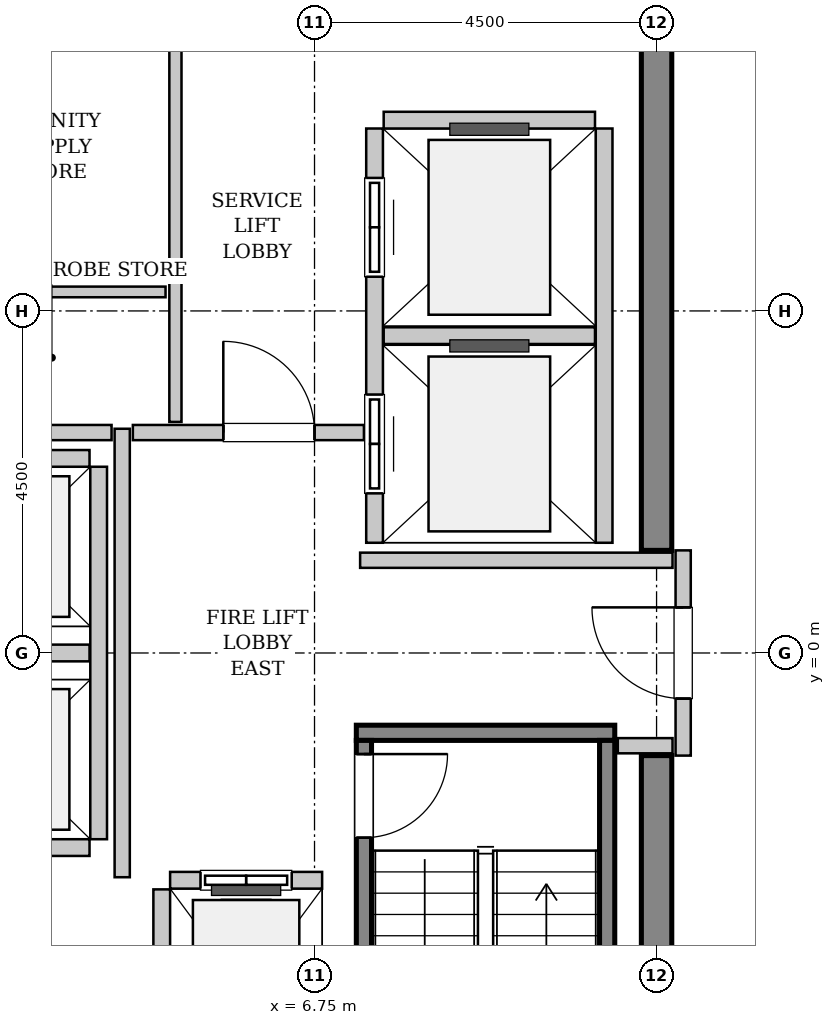
"""IFC4 building model, lengths in metres.
Left out: names, types, materials, properties, quantities, classifications, styles, units other than length and angle.
Written with IfcOpenShell. Run it as: python <this file> out.ifc"""

import sys

from ifc_helpers import new_model, si_unit, direction, frame, frame_2d, origin, place, context, subcontext, project, spatial, rectangle, extrude, source, transform, mapped, element, fill, save


model = new_model("IFC4")
c1 = context("Model", 3, precision=1e-05, world=origin(), true_north=direction((0.0, 1.0)))
c2 = subcontext(c1, "Body", "Model", "MODEL_VIEW")
j1 = project(units=[si_unit("LENGTHUNIT", "METRE"), si_unit("PLANEANGLEUNIT", "RADIAN")], contexts=[c1])
p1 = place(None, origin())
s1 = spatial("IfcSite", under=j1, at=p1, CompositionType="ELEMENT")
p2 = place(p1, origin())
s2 = spatial("IfcBuilding", under=s1, at=p2, CompositionType="ELEMENT")
p3 = place(p2, frame((0.0, 0.0, 349.0)))
s3 = spatial("IfcBuildingStorey", under=s2, at=p3, CompositionType="ELEMENT", Elevation=349.0)
m1 = source(origin(), c2, "Body", "SweptSolid", [
    extrude(rectangle(XDim=7.45, YDim=0.4, at=frame_2d((3.725, 0.0))), origin(), (0.0, 0.0, 1.0), 4.8),
])
for number, where, z_axis, x_axis in (
    (1, (11.25, -8.8, 0.0), (0.0, 0.0, 1.0), (0.0, 1.0, 0.0)),
    (2, (11.25, 1.35, 0.0), (0.0, 0.0, 1.0), (0.0, 1.0, 0.0)),
):
    element("IfcWall", number, at=place(p3, frame(where, z_axis=z_axis, x_axis=x_axis)), inside=s3, PredefinedType="SHEAR", context=c2, shape_type="MappedRepresentation", body=[
        mapped(m1, transform((0.0, 0.0, 0.0), x_axis=(1.0, 0.0, 0.0), y_axis=(0.0, 1.0, 0.0), z_axis=(0.0, 0.0, 1.0), scale=1.0)),
    ])
m2 = source(origin(), c2, "Body", "SweptSolid", [
    extrude(rectangle(XDim=3.4, YDim=0.2, at=frame_2d((1.7, 0.0))), origin(), (0.0, 0.0, 1.0), 4.8),
])
p4 = place(p3, frame((7.3, -1.05, 0.0), z_axis=(0.0, 0.0, 1.0), x_axis=(1.0, 0.0, 0.0)))
e3 = element("IfcWall", 3, at=p4, inside=s3, PredefinedType="SOLIDWALL", context=c2, shape_type="MappedRepresentation", body=[
    mapped(m2, transform((0.0, 0.0, 0.0), x_axis=(1.0, 0.0, 0.0), y_axis=(0.0, 1.0, 0.0), z_axis=(0.0, 0.0, 1.0), scale=1.0)),
])
m3 = source(origin(), c2, "Body", "SweptSolid", [
    extrude(rectangle(XDim=7.1, YDim=0.2, at=frame_2d((3.55, 0.0))), origin(), (0.0, 0.0, 1.0), 4.8),
])
p5 = place(p3, frame((7.4, -1.15, 0.0), z_axis=(0.0, 0.0, 1.0), x_axis=(0.0, -1.0, 0.0)))
e4 = element("IfcWall", 4, at=p5, inside=s3, PredefinedType="SOLIDWALL", context=c2, shape_type="MappedRepresentation", body=[
    mapped(m3, transform((0.0, 0.0, 0.0), x_axis=(1.0, 0.0, 0.0), y_axis=(0.0, 1.0, 0.0), z_axis=(0.0, 0.0, 1.0), scale=1.0)),
])
p6 = place(p5, frame((0.18, 0.0, 0.0)))
e5 = element("IfcOpeningElement", 5, at=p6, cuts=e4, PredefinedType="OPENING", context=c2, shape_type="SweptSolid", body=[
    extrude(rectangle(XDim=1.1, YDim=2.15, at=frame_2d((0.55, 1.075))), frame((0.0, 0.11, 0.0), z_axis=(0.0, -1.0, 0.0), x_axis=(1.0, 0.0, 0.0)), (0.0, 0.0, 1.0), 0.22),
])
p7 = place(p3, frame((10.6, -1.15, 0.0), z_axis=(0.0, 0.0, 1.0), x_axis=(0.0, -1.0, 0.0)))
e6 = element("IfcWall", 6, at=p7, inside=s3, PredefinedType="SOLIDWALL", context=c2, shape_type="MappedRepresentation", body=[
    mapped(m3, transform((0.0, 0.0, 0.0), x_axis=(1.0, 0.0, 0.0), y_axis=(0.0, 1.0, 0.0), z_axis=(0.0, 0.0, 1.0), scale=1.0)),
])
m4 = source(origin(), c2, "Body", "SweptSolid", [
    extrude(rectangle(XDim=2.0, YDim=0.22, at=frame_2d((1.0, 0.0))), origin(), (0.0, 0.0, 1.0), 4.485),
])
p8 = place(p3, frame((6.85, -2.99, 0.0), z_axis=(0.0, 0.0, 1.0), x_axis=(-1.0, 0.0, 0.0)))
e7 = element("IfcWall", 7, at=p8, inside=s3, PredefinedType="SOLIDWALL", context=c2, shape_type="MappedRepresentation", body=[
    mapped(m4, transform((0.0, 0.0, 0.0), x_axis=(1.0, 0.0, 0.0), y_axis=(0.0, 1.0, 0.0), z_axis=(0.0, 0.0, 1.0), scale=1.0)),
])
p9 = place(p8, frame((0.4, 0.0, 0.0)))
e8 = element("IfcOpeningElement", 8, at=p9, cuts=e7, PredefinedType="OPENING", context=c2, shape_type="SweptSolid", body=[
    extrude(rectangle(XDim=1.2, YDim=2.2, at=frame_2d((0.6, 1.1))), frame((0.0, 0.12, 0.0), z_axis=(0.0, -1.0, 0.0), x_axis=(1.0, 0.0, 0.0)), (0.0, 0.0, 1.0), 0.24),
])
m5 = source(origin(), c2, "Body", "SweptSolid", [
    extrude(rectangle(XDim=2.68, YDim=0.22, at=frame_2d((1.34, 0.0))), origin(), (0.0, 0.0, 1.0), 4.485),
])
p10 = place(p3, frame((4.74, -3.11, 0.0), z_axis=(0.0, 0.0, 1.0), x_axis=(0.0, -1.0, 0.0)))
e9 = element("IfcWall", 9, at=p10, inside=s3, PredefinedType="SOLIDWALL", context=c2, shape_type="MappedRepresentation", body=[
    mapped(m5, transform((0.0, 0.0, 0.0), x_axis=(1.0, 0.0, 0.0), y_axis=(0.0, 1.0, 0.0), z_axis=(0.0, 0.0, 1.0), scale=1.0)),
])
m6 = source(origin(), c2, "Body", "SweptSolid", [
    extrude(rectangle(XDim=5.45, YDim=0.22, at=frame_2d((2.725, 0.0))), origin(), (0.0, 0.0, 1.0), 4.485),
])
p11 = place(p3, frame((7.54, 6.9, 0.0), z_axis=(0.0, 0.0, 1.0), x_axis=(0.0, -1.0, 0.0)))
e10 = element("IfcWall", 10, at=p11, inside=s3, PredefinedType="SOLIDWALL", context=c2, shape_type="MappedRepresentation", body=[
    mapped(m6, transform((0.0, 0.0, 0.0), x_axis=(1.0, 0.0, 0.0), y_axis=(0.0, 1.0, 0.0), z_axis=(0.0, 0.0, 1.0), scale=1.0)),
])
p12 = place(p11, frame((3.5, 0.0, 0.0)))
e11 = element("IfcOpeningElement", 11, at=p12, cuts=e10, PredefinedType="OPENING", context=c2, shape_type="SweptSolid", body=[
    extrude(rectangle(XDim=1.3, YDim=2.3, at=frame_2d((0.65, 1.15))), frame((0.0, 0.12, 0.0), z_axis=(0.0, -1.0, 0.0), x_axis=(1.0, 0.0, 0.0)), (0.0, 0.0, 1.0), 0.24),
])
p13 = place(p11, frame((0.65, 0.0, 0.0)))
e12 = element("IfcOpeningElement", 12, at=p13, cuts=e10, PredefinedType="OPENING", context=c2, shape_type="SweptSolid", body=[
    extrude(rectangle(XDim=1.3, YDim=2.3, at=frame_2d((0.65, 1.15))), frame((0.0, 0.12, 0.0), z_axis=(0.0, -1.0, 0.0), x_axis=(1.0, 0.0, 0.0)), (0.0, 0.0, 1.0), 0.24),
])
p14 = place(p3, frame((10.56, 1.45, 0.0), z_axis=(0.0, 0.0, 1.0), x_axis=(0.0, 1.0, 0.0)))
e13 = element("IfcWall", 13, at=p14, inside=s3, PredefinedType="SOLIDWALL", context=c2, shape_type="MappedRepresentation", body=[
    mapped(m6, transform((0.0, 0.0, 0.0), x_axis=(1.0, 0.0, 0.0), y_axis=(0.0, 1.0, 0.0), z_axis=(0.0, 0.0, 1.0), scale=1.0)),
])
m7 = source(origin(), c2, "Body", "SweptSolid", [
    extrude(rectangle(XDim=2.78, YDim=0.22, at=frame_2d((1.39, 0.0))), origin(), (0.0, 0.0, 1.0), 4.485),
])
for number, where, z_axis, x_axis in (
    (14, (7.66, 4.175, 0.0), (0.0, 0.0, 1.0), (1.0, 0.0, 0.0)),
    (15, (10.44, 7.01, 0.0), (0.0, 0.0, 1.0), (-1.0, 0.0, 0.0)),
):
    element("IfcWall", number, at=place(p3, frame(where, z_axis=z_axis, x_axis=x_axis)), inside=s3, PredefinedType="SOLIDWALL", context=c2, shape_type="MappedRepresentation", body=[
        mapped(m7, transform((0.0, 0.0, 0.0), x_axis=(1.0, 0.0, 0.0), y_axis=(0.0, 1.0, 0.0), z_axis=(0.0, 0.0, 1.0), scale=1.0)),
    ])
m8 = source(origin(), c2, "Body", "SweptSolid", [
    extrude(rectangle(XDim=4.9, YDim=0.22, at=frame_2d((2.45, 0.0))), origin(), (0.0, 0.0, 1.0), 4.485),
])
p15 = place(p3, frame((3.91, -2.45, 0.0), z_axis=(0.0, 0.0, 1.0), x_axis=(0.0, 1.0, 0.0)))
e16 = element("IfcWall", 16, at=p15, inside=s3, PredefinedType="SOLIDWALL", context=c2, shape_type="MappedRepresentation", body=[
    mapped(m8, transform((0.0, 0.0, 0.0), x_axis=(1.0, 0.0, 0.0), y_axis=(0.0, 1.0, 0.0), z_axis=(0.0, 0.0, 1.0), scale=1.0)),
])
m9 = source(origin(), c2, "Body", "SweptSolid", [
    extrude(rectangle(XDim=2.13, YDim=0.22, at=frame_2d((1.065, 0.0))), origin(), (0.0, 0.0, 1.0), 4.485),
])
for number, where, z_axis, x_axis in (
    (17, (1.66, -2.56, 0.0), (0.0, 0.0, 1.0), (1.0, 0.0, 0.0)),
    (18, (1.66, 0.0, 0.0), (0.0, 0.0, 1.0), (1.0, 0.0, 0.0)),
    (19, (3.79, 2.56, 0.0), (0.0, 0.0, 1.0), (-1.0, 0.0, 0.0)),
):
    element("IfcWall", number, at=place(p3, frame(where, z_axis=z_axis, x_axis=x_axis)), inside=s3, PredefinedType="SOLIDWALL", context=c2, shape_type="MappedRepresentation", body=[
        mapped(m9, transform((0.0, 0.0, 0.0), x_axis=(1.0, 0.0, 0.0), y_axis=(0.0, 1.0, 0.0), z_axis=(0.0, 0.0, 1.0), scale=1.0)),
    ])
m10 = source(origin(), c2, "Body", "SweptSolid", [
    extrude(rectangle(XDim=2.7, YDim=0.2, at=frame_2d((1.35, 0.0))), origin(), (0.0, 0.0, 1.0), 3.575),
])
p16 = place(p3, frame((11.6, -1.35, 0.0), z_axis=(0.0, 0.0, 1.0), x_axis=(0.0, 1.0, 0.0)))
e20 = element("IfcWall", 20, at=p16, inside=s3, PredefinedType="PARTITIONING", context=c2, shape_type="MappedRepresentation", body=[
    mapped(m10, transform((0.0, 0.0, 0.0), x_axis=(1.0, 0.0, 0.0), y_axis=(0.0, 1.0, 0.0), z_axis=(0.0, 0.0, 1.0), scale=1.0)),
])
p17 = place(p16, frame((0.75, 0.0, 0.0)))
e21 = element("IfcOpeningElement", 21, at=p17, cuts=e20, PredefinedType="OPENING", context=c2, shape_type="SweptSolid", body=[
    extrude(rectangle(XDim=1.2, YDim=2.15, at=frame_2d((0.6, 1.075))), frame((0.0, 0.11, 0.0), z_axis=(0.0, -1.0, 0.0), x_axis=(1.0, 0.0, 0.0)), (0.0, 0.0, 1.0), 0.22),
])
m11 = source(origin(), c2, "Body", "SweptSolid", [
    extrude(rectangle(XDim=5.9, YDim=0.2, at=frame_2d((2.95, 0.0))), origin(), (0.0, 0.0, 1.0), 4.485),
])
p18 = place(p3, frame((4.22, -2.95, 0.0), z_axis=(0.0, 0.0, 1.0), x_axis=(0.0, 1.0, 0.0)))
e22 = element("IfcWall", 22, at=p18, inside=s3, PredefinedType="PARTITIONING", context=c2, shape_type="MappedRepresentation", body=[
    mapped(m11, transform((0.0, 0.0, 0.0), x_axis=(1.0, 0.0, 0.0), y_axis=(0.0, 1.0, 0.0), z_axis=(0.0, 0.0, 1.0), scale=1.0)),
])
m12 = source(origin(), c2, "Body", "SweptSolid", [
    extrude(rectangle(XDim=2.52, YDim=0.2, at=frame_2d((1.26, 0.0))), origin(), (0.0, 0.0, 1.0), 4.485),
])
p19 = place(p3, frame((1.56, 2.9, 0.0), z_axis=(0.0, 0.0, 1.0), x_axis=(1.0, 0.0, 0.0)))
e23 = element("IfcWall", 23, at=p19, inside=s3, PredefinedType="PARTITIONING", context=c2, shape_type="MappedRepresentation", body=[
    mapped(m12, transform((0.0, 0.0, 0.0), x_axis=(1.0, 0.0, 0.0), y_axis=(0.0, 1.0, 0.0), z_axis=(0.0, 0.0, 1.0), scale=1.0)),
])
m13 = source(origin(), c2, "Body", "SweptSolid", [
    extrude(rectangle(XDim=3.04, YDim=0.2, at=frame_2d((1.52, 0.0))), origin(), (0.0, 0.0, 1.0), 4.485),
])
p20 = place(p3, frame((4.36, 2.9, 0.0), z_axis=(0.0, 0.0, 1.0), x_axis=(1.0, 0.0, 0.0)))
e24 = element("IfcWall", 24, at=p20, inside=s3, PredefinedType="PARTITIONING", context=c2, shape_type="MappedRepresentation", body=[
    mapped(m13, transform((0.0, 0.0, 0.0), x_axis=(1.0, 0.0, 0.0), y_axis=(0.0, 1.0, 0.0), z_axis=(0.0, 0.0, 1.0), scale=1.0)),
])
p21 = place(p20, frame((1.19, 0.0, 0.0)))
e25 = element("IfcOpeningElement", 25, at=p21, cuts=e24, PredefinedType="OPENING", context=c2, shape_type="SweptSolid", body=[
    extrude(rectangle(XDim=1.2, YDim=2.15, at=frame_2d((0.6, 1.075))), frame((0.0, 0.11, 0.0), z_axis=(0.0, -1.0, 0.0), x_axis=(1.0, 0.0, 0.0)), (0.0, 0.0, 1.0), 0.22),
])
m14 = source(origin(), c2, "Body", "SweptSolid", [
    extrude(rectangle(XDim=4.11, YDim=0.2, at=frame_2d((2.055, 0.0))), origin(), (0.0, 0.0, 1.0), 4.485),
])
p22 = place(p3, frame((7.35, 1.22, 0.0), z_axis=(0.0, 0.0, 1.0), x_axis=(1.0, 0.0, 0.0)))
e26 = element("IfcWall", 26, at=p22, inside=s3, PredefinedType="PARTITIONING", context=c2, shape_type="MappedRepresentation", body=[
    mapped(m14, transform((0.0, 0.0, 0.0), x_axis=(1.0, 0.0, 0.0), y_axis=(0.0, 1.0, 0.0), z_axis=(0.0, 0.0, 1.0), scale=1.0)),
])
m15 = source(origin(), c2, "Body", "SweptSolid", [
    extrude(rectangle(XDim=0.72, YDim=0.2, at=frame_2d((0.36, 0.0))), origin(), (0.0, 0.0, 1.0), 4.485),
])
p23 = place(p3, frame((10.74, -1.22, 0.0), z_axis=(0.0, 0.0, 1.0), x_axis=(1.0, 0.0, 0.0)))
e27 = element("IfcWall", 27, at=p23, inside=s3, PredefinedType="PARTITIONING", context=c2, shape_type="MappedRepresentation", body=[
    mapped(m15, transform((0.0, 0.0, 0.0), x_axis=(1.0, 0.0, 0.0), y_axis=(0.0, 1.0, 0.0), z_axis=(0.0, 0.0, 1.0), scale=1.0)),
])
m16 = source(origin(), c2, "Body", "SweptSolid", [
    extrude(rectangle(XDim=5.45, YDim=0.16, at=frame_2d((2.725, 0.0))), origin(), (0.0, 0.0, 1.0), 4.485),
])
p24 = place(p3, frame((4.92, 3.04, 0.0), z_axis=(0.0, 0.0, 1.0), x_axis=(0.0, 1.0, 0.0)))
e28 = element("IfcWall", 28, at=p24, inside=s3, PredefinedType="PARTITIONING", context=c2, shape_type="MappedRepresentation", body=[
    mapped(m16, transform((0.0, 0.0, 0.0), x_axis=(1.0, 0.0, 0.0), y_axis=(0.0, 1.0, 0.0), z_axis=(0.0, 0.0, 1.0), scale=1.0)),
])
m17 = source(origin(), c2, "Body", "SweptSolid", [
    extrude(rectangle(XDim=3.15, YDim=0.14, at=frame_2d((1.575, 0.0))), origin(), (0.0, 0.0, 1.0), 4.485),
])
p25 = place(p3, frame((1.64, 4.75, 0.0), z_axis=(0.0, 0.0, 1.0), x_axis=(1.0, 0.0, 0.0)))
e29 = element("IfcWall", 29, at=p25, inside=s3, PredefinedType="PARTITIONING", context=c2, shape_type="MappedRepresentation", body=[
    mapped(m17, transform((0.0, 0.0, 0.0), x_axis=(1.0, 0.0, 0.0), y_axis=(0.0, 1.0, 0.0), z_axis=(0.0, 0.0, 1.0), scale=1.0)),
])
m18 = source(origin(), c2, "Body", "SweptSolid", [
    extrude(rectangle(XDim=1.1, YDim=2.15, at=frame_2d((0.55, 1.075))), frame((0.0, 0.025, 0.0), z_axis=(0.0, -1.0, 0.0), x_axis=(1.0, 0.0, 0.0)), (0.0, 0.0, 1.0), 0.05),
])
p26 = place(p6, origin())
e30 = element("IfcDoor", 30, at=p26, inside=s3, OperationType="SINGLE_SWING_LEFT", PredefinedType="DOOR", context=c2, shape_type="MappedRepresentation", body=[
    mapped(m18, transform((0.0, 0.0, 0.0), x_axis=(1.0, 0.0, 0.0), y_axis=(0.0, 1.0, 0.0), z_axis=(0.0, 0.0, 1.0), scale=1.0)),
])
fill(e5, e30)
m19 = source(origin(), c2, "Body", "SweptSolid", [
    extrude(rectangle(XDim=1.2, YDim=2.2, at=frame_2d((0.6, 1.1))), frame((0.0, 0.025, 0.0), z_axis=(0.0, -1.0, 0.0), x_axis=(1.0, 0.0, 0.0)), (0.0, 0.0, 1.0), 0.05),
])
p27 = place(p9, origin())
e31 = element("IfcDoor", 31, at=p27, inside=s3, OperationType="SLIDING_TO_LEFT", PredefinedType="DOOR", context=c2, shape_type="MappedRepresentation", body=[
    mapped(m19, transform((0.0, 0.0, 0.0), x_axis=(1.0, 0.0, 0.0), y_axis=(0.0, 1.0, 0.0), z_axis=(0.0, 0.0, 1.0), scale=1.0)),
])
fill(e8, e31)
m20 = source(origin(), c2, "Body", "SweptSolid", [
    extrude(rectangle(XDim=1.3, YDim=2.3, at=frame_2d((0.65, 1.15))), frame((0.0, 0.025, 0.0), z_axis=(0.0, -1.0, 0.0), x_axis=(1.0, 0.0, 0.0)), (0.0, 0.0, 1.0), 0.05),
])
p28 = place(p12, origin())
e32 = element("IfcDoor", 32, at=p28, inside=s3, OperationType="SLIDING_TO_RIGHT", PredefinedType="DOOR", context=c2, shape_type="MappedRepresentation", body=[
    mapped(m20, transform((0.0, 0.0, 0.0), x_axis=(1.0, 0.0, 0.0), y_axis=(0.0, 1.0, 0.0), z_axis=(0.0, 0.0, 1.0), scale=1.0)),
])
fill(e11, e32)
p29 = place(p13, origin())
e33 = element("IfcDoor", 33, at=p29, inside=s3, OperationType="SLIDING_TO_RIGHT", PredefinedType="DOOR", context=c2, shape_type="MappedRepresentation", body=[
    mapped(m20, transform((0.0, 0.0, 0.0), x_axis=(1.0, 0.0, 0.0), y_axis=(0.0, 1.0, 0.0), z_axis=(0.0, 0.0, 1.0), scale=1.0)),
])
fill(e12, e33)
m21 = source(origin(), c2, "Body", "SweptSolid", [
    extrude(rectangle(XDim=1.2, YDim=2.15, at=frame_2d((0.6, 1.075))), frame((0.0, 0.025, 0.0), z_axis=(0.0, -1.0, 0.0), x_axis=(1.0, 0.0, 0.0)), (0.0, 0.0, 1.0), 0.05),
])
p30 = place(p17, origin())
e34 = element("IfcDoor", 34, at=p30, inside=s3, OperationType="SINGLE_SWING_RIGHT", PredefinedType="DOOR", context=c2, shape_type="MappedRepresentation", body=[
    mapped(m21, transform((0.0, 0.0, 0.0), x_axis=(1.0, 0.0, 0.0), y_axis=(0.0, 1.0, 0.0), z_axis=(0.0, 0.0, 1.0), scale=1.0)),
])
fill(e21, e34)
p31 = place(p21, origin())
e35 = element("IfcDoor", 35, at=p31, inside=s3, OperationType="SINGLE_SWING_LEFT", PredefinedType="DOOR", context=c2, shape_type="MappedRepresentation", body=[
    mapped(m21, transform((0.0, 0.0, 0.0), x_axis=(1.0, 0.0, 0.0), y_axis=(0.0, 1.0, 0.0), z_axis=(0.0, 0.0, 1.0), scale=1.0)),
])
fill(e25, e35)
save(model, sys.argv[1])
